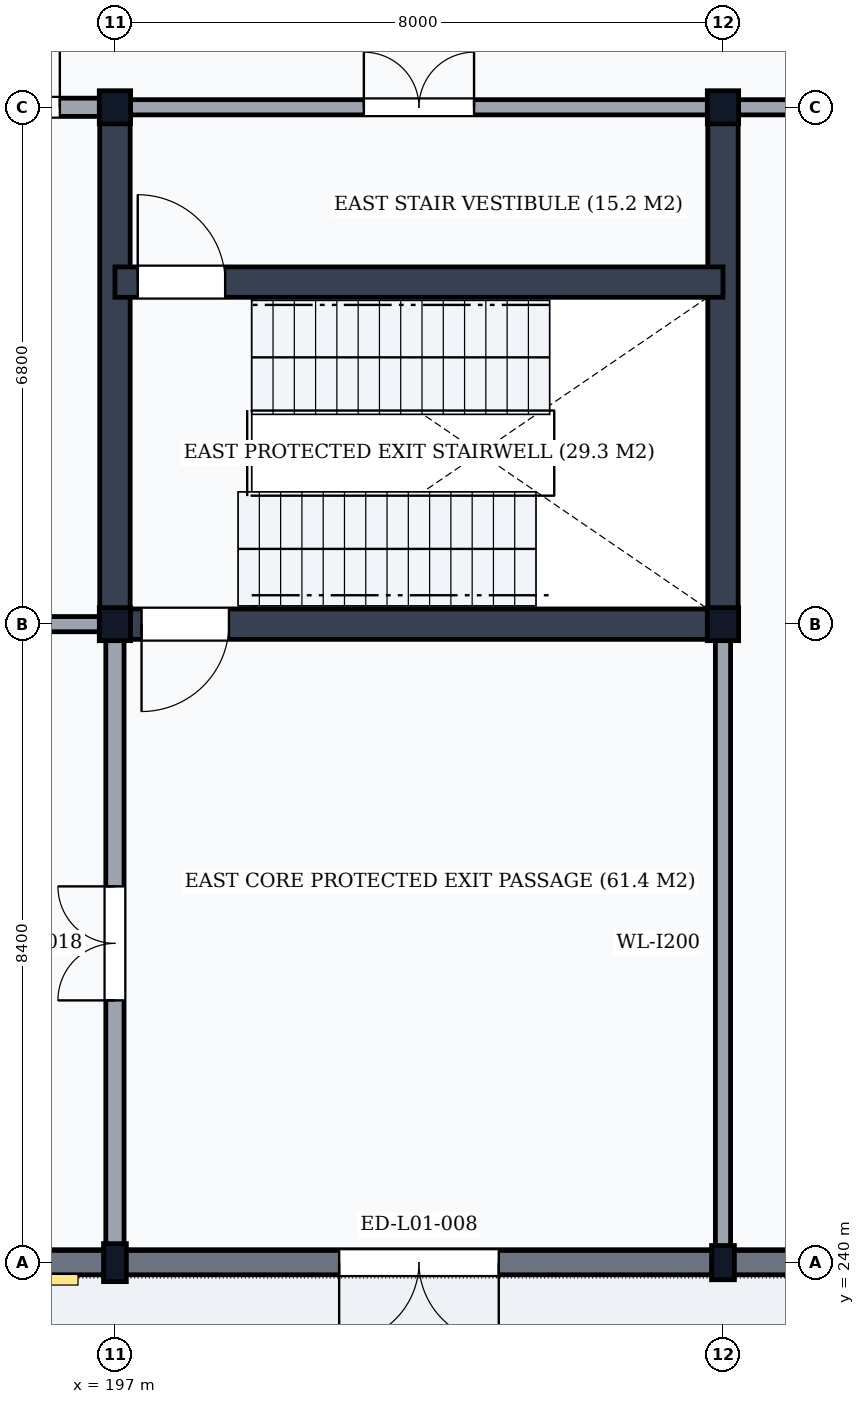
"""IFC4 building model, lengths in metres.
Left out: names, types, materials, properties, quantities, classifications, styles, units other than length and angle.
Written with IfcOpenShell. Run it as: python <this file> out.ifc"""

import sys

from ifc_helpers import new_model, si_unit, direction, frame, frame_2d, origin, origin_2d, place, context, subcontext, project, spatial, rectangle, i_section, extrude, element, fill, save


model = new_model("IFC4")
c1 = context("Model", 3, precision=1e-05, world=origin(), true_north=direction((0.0, 1.0)))
c2 = subcontext(c1, "Body", "Model", "MODEL_VIEW")
j1 = project(units=[si_unit("LENGTHUNIT", "METRE"), si_unit("PLANEANGLEUNIT", "RADIAN")], contexts=[c1])
p1 = place(None, origin())
s1 = spatial("IfcSite", under=j1, at=p1, CompositionType="ELEMENT")
p2 = place(p1, origin())
s2 = spatial("IfcBuilding", under=s1, at=p2, CompositionType="ELEMENT")
p3 = place(p2, origin())
s3 = spatial("IfcBuildingStorey", under=s2, at=p3, CompositionType="ELEMENT", Elevation=0.0)
p4 = place(p3, frame((197.0, 240.0, 0.0), z_axis=(0.0, 0.0, 1.0), x_axis=(1.0, 0.0, 0.0)))
e1 = element("IfcColumn", 1, at=p4, inside=s3, PredefinedType="COLUMN", context=c2, shape_type="SweptSolid", body=[
    extrude(i_section(OverallWidth=0.3, OverallDepth=0.5, WebThickness=0.014, FlangeThickness=0.028, FilletRadius=0.027, at=origin_2d()), origin(), (0.0, 0.0, 1.0), 5.4),
])
for number, where, z_axis, x_axis in (
    (2, (197.0, 248.4, 0.0), (0.0, 0.0, 1.0), (1.0, 0.0, 0.0)),
    (3, (197.0, 255.2, 0.0), (0.0, 0.0, 1.0), (1.0, 0.0, 0.0)),
):
    element("IfcColumn", number, at=place(p3, frame(where, z_axis=z_axis, x_axis=x_axis)), inside=s3, PredefinedType="COLUMN", context=c2, shape_type="SweptSolid", body=[
        extrude(i_section(OverallWidth=0.412, OverallDepth=0.435, WebThickness=0.036, FlangeThickness=0.057, FilletRadius=0.015, at=origin_2d()), origin(), (0.0, 0.0, 1.0), 5.4),
    ])
p5 = place(p3, frame((205.0, 240.0, 0.0), z_axis=(0.0, 0.0, 1.0), x_axis=(1.0, 0.0, 0.0)))
e4 = element("IfcColumn", 4, at=p5, inside=s3, PredefinedType="COLUMN", context=c2, shape_type="SweptSolid", body=[
    extrude(i_section(OverallWidth=0.3, OverallDepth=0.45, WebThickness=0.014, FlangeThickness=0.026, FilletRadius=0.027, at=origin_2d()), origin(), (0.0, 0.0, 1.0), 5.4),
])
for number, where, z_axis, x_axis in (
    (5, (205.0, 248.4, 0.0), (0.0, 0.0, 1.0), (1.0, 0.0, 0.0)),
    (6, (205.0, 255.2, 0.0), (0.0, 0.0, 1.0), (1.0, 0.0, 0.0)),
):
    element("IfcColumn", number, at=place(p3, frame(where, z_axis=z_axis, x_axis=x_axis)), inside=s3, PredefinedType="COLUMN", context=c2, shape_type="SweptSolid", body=[
        extrude(i_section(OverallWidth=0.412, OverallDepth=0.435, WebThickness=0.036, FlangeThickness=0.057, FilletRadius=0.015, at=origin_2d()), origin(), (0.0, 0.0, 1.0), 5.4),
    ])
p6 = place(p3, frame((189.006, 240.0, 0.0), z_axis=(0.0, 0.0, 1.0), x_axis=(1.0, 0.0, 0.0)))
e7 = element("IfcWall", 7, at=p6, inside=s3, PredefinedType="SOLIDWALL", context=c2, shape_type="SweptSolid", body=[
    extrude(rectangle(XDim=7.988, YDim=0.32, at=frame_2d((3.994, 0.0))), origin(), (0.0, 0.0, 1.0), 4.838),
])
p7 = place(p6, frame((2.944, 0.0, 0.0)))
e8 = element("IfcOpeningElement", 8, at=p7, cuts=e7, PredefinedType="OPENING", context=c2, shape_type="SweptSolid", body=[
    extrude(rectangle(XDim=2.1, YDim=2.7, at=frame_2d((1.05, 1.35))), frame((0.0, 0.175, 0.0), z_axis=(0.0, -1.0, 0.0), x_axis=(1.0, 0.0, 0.0)), (0.0, 0.0, 1.0), 0.35),
])
p8 = place(p3, frame((197.006, 240.0, 0.0), z_axis=(0.0, 0.0, 1.0), x_axis=(1.0, 0.0, 0.0)))
e9 = element("IfcWall", 9, at=p8, inside=s3, PredefinedType="SOLIDWALL", context=c2, shape_type="SweptSolid", body=[
    extrude(rectangle(XDim=7.988, YDim=0.32, at=frame_2d((3.994, 0.0))), origin(), (0.0, 0.0, 1.0), 4.838),
])
p9 = place(p8, frame((2.944, 0.0, 0.0)))
e10 = element("IfcOpeningElement", 10, at=p9, cuts=e9, PredefinedType="OPENING", context=c2, shape_type="SweptSolid", body=[
    extrude(rectangle(XDim=2.1, YDim=2.7, at=frame_2d((1.05, 1.35))), frame((0.0, 0.175, 0.0), z_axis=(0.0, -1.0, 0.0), x_axis=(1.0, 0.0, 0.0)), (0.0, 0.0, 1.0), 0.35),
])
p10 = place(p3, frame((205.006, 240.0, 0.0), z_axis=(0.0, 0.0, 1.0), x_axis=(1.0, 0.0, 0.0)))
e11 = element("IfcWall", 11, at=p10, inside=s3, PredefinedType="SOLIDWALL", context=c2, shape_type="SweptSolid", body=[
    extrude(rectangle(XDim=7.988, YDim=0.32, at=frame_2d((3.994, 0.0))), origin(), (0.0, 0.0, 1.0), 4.838),
])
p11 = place(p10, frame((2.944, 0.0, 0.0)))
e12 = element("IfcOpeningElement", 12, at=p11, cuts=e11, PredefinedType="OPENING", context=c2, shape_type="SweptSolid", body=[
    extrude(rectangle(XDim=2.1, YDim=2.7, at=frame_2d((1.05, 1.35))), frame((0.0, 0.175, 0.0), z_axis=(0.0, -1.0, 0.0), x_axis=(1.0, 0.0, 0.0)), (0.0, 0.0, 1.0), 0.35),
])
p12 = place(p3, frame((120.1, 240.1, 5.4), z_axis=(0.0, 0.0, 1.0), x_axis=(1.0, 0.0, 0.0)))
e13 = element("IfcWall", 13, at=p12, inside=s3, PredefinedType="PARAPET", context=c2, shape_type="SweptSolid", body=[
    extrude(rectangle(XDim=167.8, YDim=0.18, at=frame_2d((83.9, 0.0))), origin(), (0.0, 0.0, 1.0), 1.2),
])
p13 = place(p3, frame((197.0, 248.4, 0.0), z_axis=(0.0, 0.0, 1.0), x_axis=(1.0, 0.0, 0.0)))
e14 = element("IfcWall", 14, at=p13, inside=s3, PredefinedType="SHEAR", context=c2, shape_type="SweptSolid", body=[
    extrude(rectangle(XDim=8.0, YDim=0.4, at=frame_2d((4.0, 0.0))), origin(), (0.0, 0.0, 1.0), 5.14),
])
p14 = place(p13, frame((0.35, 0.0, 0.0)))
e15 = element("IfcOpeningElement", 15, at=p14, cuts=e14, PredefinedType="OPENING", context=c2, shape_type="SweptSolid", body=[
    extrude(rectangle(XDim=1.15, YDim=2.15, at=frame_2d((0.575, 1.075))), frame((0.0, 0.215, 0.0), z_axis=(0.0, -1.0, 0.0), x_axis=(1.0, 0.0, 0.0)), (0.0, 0.0, 1.0), 0.43),
])
for number, where, z_axis, x_axis in (
    (16, (197.0, 248.4, 0.0), (0.0, 0.0, 1.0), (0.0, 1.0, 0.0)),
    (17, (205.0, 248.4, 0.0), (0.0, 0.0, 1.0), (0.0, 1.0, 0.0)),
):
    element("IfcWall", number, at=place(p3, frame(where, z_axis=z_axis, x_axis=x_axis)), inside=s3, PredefinedType="SHEAR", context=c2, shape_type="SweptSolid", body=[
        extrude(rectangle(XDim=6.8, YDim=0.4, at=frame_2d((3.4, 0.0))), origin(), (0.0, 0.0, 1.0), 5.14),
    ])
p15 = place(p3, frame((197.0, 252.9, 0.0), z_axis=(0.0, 0.0, 1.0), x_axis=(1.0, 0.0, 0.0)))
e18 = element("IfcWall", 18, at=p15, inside=s3, PredefinedType="SHEAR", context=c2, shape_type="SweptSolid", body=[
    extrude(rectangle(XDim=8.0, YDim=0.4, at=frame_2d((4.0, 0.0))), origin(), (0.0, 0.0, 1.0), 5.14),
])
p16 = place(p15, frame((0.3, 0.0, 0.0)))
e19 = element("IfcOpeningElement", 19, at=p16, cuts=e18, PredefinedType="OPENING", context=c2, shape_type="SweptSolid", body=[
    extrude(rectangle(XDim=1.15, YDim=2.15, at=frame_2d((0.575, 1.075))), frame((0.0, 0.215, 0.0), z_axis=(0.0, -1.0, 0.0), x_axis=(1.0, 0.0, 0.0)), (0.0, 0.0, 1.0), 0.43),
])
p17 = place(p3, frame((197.0, 255.2, 0.0), z_axis=(0.0, 0.0, 1.0), x_axis=(1.0, 0.0, 0.0)))
e20 = element("IfcWall", 20, at=p17, inside=s3, PredefinedType="PARTITIONING", context=c2, shape_type="SweptSolid", body=[
    extrude(rectangle(XDim=8.0, YDim=0.2, at=frame_2d((4.0, 0.0))), origin(), (0.0, 0.0, 1.0), 4.638),
])
p18 = place(p17, frame((3.275, 0.0, 0.0)))
e21 = element("IfcOpeningElement", 21, at=p18, cuts=e20, PredefinedType="OPENING", context=c2, shape_type="SweptSolid", body=[
    extrude(rectangle(XDim=1.45, YDim=2.2, at=frame_2d((0.725, 1.1))), frame((0.0, 0.115, 0.0), z_axis=(0.0, -1.0, 0.0), x_axis=(1.0, 0.0, 0.0)), (0.0, 0.0, 1.0), 0.23),
])
p19 = place(p3, frame((189.0, 255.2, 0.0), z_axis=(0.0, 0.0, 1.0), x_axis=(1.0, 0.0, 0.0)))
e22 = element("IfcWall", 22, at=p19, inside=s3, PredefinedType="PARTITIONING", context=c2, shape_type="SweptSolid", body=[
    extrude(rectangle(XDim=8.0, YDim=0.24, at=frame_2d((4.0, 0.0))), origin(), (0.0, 0.0, 1.0), 4.638),
])
p20 = place(p19, frame((1.05, 0.0, 0.0)))
e23 = element("IfcOpeningElement", 23, at=p20, cuts=e22, PredefinedType="OPENING", context=c2, shape_type="SweptSolid", body=[
    extrude(rectangle(XDim=1.0, YDim=2.1, at=frame_2d((0.5, 1.05))), frame((0.0, 0.135, 0.0), z_axis=(0.0, -1.0, 0.0), x_axis=(1.0, 0.0, 0.0)), (0.0, 0.0, 1.0), 0.27),
])
p21 = place(p19, frame((3.6, 0.0, 0.0)))
e24 = element("IfcOpeningElement", 24, at=p21, cuts=e22, PredefinedType="OPENING", context=c2, shape_type="SweptSolid", body=[
    extrude(rectangle(XDim=1.5, YDim=2.25, at=frame_2d((0.75, 1.125))), frame((0.0, 0.135, 0.0), z_axis=(0.0, -1.0, 0.0), x_axis=(1.0, 0.0, 0.0)), (0.0, 0.0, 1.0), 0.27),
])
p22 = place(p19, frame((6.425, 0.0, 0.0)))
e25 = element("IfcOpeningElement", 25, at=p22, cuts=e22, PredefinedType="OPENING", context=c2, shape_type="SweptSolid", body=[
    extrude(rectangle(XDim=0.85, YDim=2.1, at=frame_2d((0.425, 1.05))), frame((0.0, 0.135, 0.0), z_axis=(0.0, -1.0, 0.0), x_axis=(1.0, 0.0, 0.0)), (0.0, 0.0, 1.0), 0.27),
])
p23 = place(p3, frame((197.0, 240.0, 0.0), z_axis=(0.0, 0.0, 1.0), x_axis=(0.0, 1.0, 0.0)))
e26 = element("IfcWall", 26, at=p23, inside=s3, PredefinedType="PARTITIONING", context=c2, shape_type="SweptSolid", body=[
    extrude(rectangle(XDim=8.4, YDim=0.24, at=frame_2d((4.2, 0.0))), origin(), (0.0, 0.0, 1.0), 4.688),
])
p24 = place(p23, frame((3.45, 0.0, 0.0)))
e27 = element("IfcOpeningElement", 27, at=p24, cuts=e26, PredefinedType="OPENING", context=c2, shape_type="SweptSolid", body=[
    extrude(rectangle(XDim=1.5, YDim=2.1, at=frame_2d((0.75, 1.05))), frame((0.0, 0.135, 0.0), z_axis=(0.0, -1.0, 0.0), x_axis=(1.0, 0.0, 0.0)), (0.0, 0.0, 1.0), 0.27),
])
p25 = place(p3, frame((189.0, 248.4, 0.0), z_axis=(0.0, 0.0, 1.0), x_axis=(1.0, 0.0, 0.0)))
e28 = element("IfcWall", 28, at=p25, inside=s3, PredefinedType="PARTITIONING", context=c2, shape_type="SweptSolid", body=[
    extrude(rectangle(XDim=8.0, YDim=0.2, at=frame_2d((4.0, 0.0))), origin(), (0.0, 0.0, 1.0), 4.638),
])
p26 = place(p3, frame((205.0, 240.0, 0.0), z_axis=(0.0, 0.0, 1.0), x_axis=(0.0, 1.0, 0.0)))
e29 = element("IfcWall", 29, at=p26, inside=s3, PredefinedType="PARTITIONING", context=c2, shape_type="SweptSolid", body=[
    extrude(rectangle(XDim=8.4, YDim=0.2, at=frame_2d((4.2, 0.0))), origin(), (0.0, 0.0, 1.0), 4.688),
])
p27 = place(p3, frame((205.0, 255.2, 0.0), z_axis=(0.0, 0.0, 1.0), x_axis=(1.0, 0.0, 0.0)))
e30 = element("IfcWall", 30, at=p27, inside=s3, PredefinedType="PARTITIONING", context=c2, shape_type="SweptSolid", body=[
    extrude(rectangle(XDim=24.0, YDim=0.2, at=frame_2d((12.0, 0.0))), origin(), (0.0, 0.0, 1.0), 4.638),
])
p28 = place(p27, frame((5.1, 0.0, 0.0)))
e31 = element("IfcOpeningElement", 31, at=p28, cuts=e30, PredefinedType="OPENING", context=c2, shape_type="SweptSolid", body=[
    extrude(rectangle(XDim=1.8, YDim=2.4, at=frame_2d((0.9, 1.2))), frame((0.0, 0.115, 0.0), z_axis=(0.0, -1.0, 0.0), x_axis=(1.0, 0.0, 0.0)), (0.0, 0.0, 1.0), 0.23),
])
p29 = place(p27, frame((17.2, 0.0, 0.0)))
e32 = element("IfcOpeningElement", 32, at=p29, cuts=e30, PredefinedType="OPENING", context=c2, shape_type="SweptSolid", body=[
    extrude(rectangle(XDim=1.6, YDim=2.25, at=frame_2d((0.8, 1.125))), frame((0.0, 0.115, 0.0), z_axis=(0.0, -1.0, 0.0), x_axis=(1.0, 0.0, 0.0)), (0.0, 0.0, 1.0), 0.23),
])
p30 = place(p9, frame((2.1, 0.0, 0.0), z_axis=(0.0, 0.0, 1.0), x_axis=(-1.0, 0.0, 0.0)))
e33 = element("IfcDoor", 33, at=p30, inside=s3, OperationType="DOUBLE_DOOR_SINGLE_SWING", PredefinedType="DOOR", context=c2, shape_type="SweptSolid", body=[
    extrude(rectangle(XDim=2.1, YDim=2.7, at=frame_2d((1.05, 1.35))), frame((0.0, 0.025, 0.0), z_axis=(0.0, -1.0, 0.0), x_axis=(1.0, 0.0, 0.0)), (0.0, 0.0, 1.0), 0.05),
])
fill(e10, e33)
p31 = place(p16, origin())
e34 = element("IfcDoor", 34, at=p31, inside=s3, OperationType="SINGLE_SWING_LEFT", PredefinedType="DOOR", context=c2, shape_type="SweptSolid", body=[
    extrude(rectangle(XDim=1.15, YDim=2.15, at=frame_2d((0.575, 1.075))), frame((0.0, 0.025, 0.0), z_axis=(0.0, -1.0, 0.0), x_axis=(1.0, 0.0, 0.0)), (0.0, 0.0, 1.0), 0.05),
])
fill(e19, e34)
p32 = place(p14, frame((1.15, 0.0, 0.0), z_axis=(0.0, 0.0, 1.0), x_axis=(-1.0, 0.0, 0.0)))
e35 = element("IfcDoor", 35, at=p32, inside=s3, OperationType="SINGLE_SWING_RIGHT", PredefinedType="DOOR", context=c2, shape_type="SweptSolid", body=[
    extrude(rectangle(XDim=1.15, YDim=2.15, at=frame_2d((0.575, 1.075))), frame((0.0, 0.025, 0.0), z_axis=(0.0, -1.0, 0.0), x_axis=(1.0, 0.0, 0.0)), (0.0, 0.0, 1.0), 0.05),
])
fill(e15, e35)
p33 = place(p18, origin())
e36 = element("IfcDoor", 36, at=p33, inside=s3, OperationType="DOUBLE_DOOR_SINGLE_SWING", PredefinedType="DOOR", context=c2, shape_type="SweptSolid", body=[
    extrude(rectangle(XDim=1.45, YDim=2.2, at=frame_2d((0.725, 1.1))), frame((0.0, 0.025, 0.0), z_axis=(0.0, -1.0, 0.0), x_axis=(1.0, 0.0, 0.0)), (0.0, 0.0, 1.0), 0.05),
])
fill(e21, e36)
p34 = place(p22, frame((0.85, 0.0, 0.0), z_axis=(0.0, 0.0, 1.0), x_axis=(-1.0, 0.0, 0.0)))
e37 = element("IfcDoor", 37, at=p34, inside=s3, OperationType="SINGLE_SWING_LEFT", PredefinedType="DOOR", context=c2, shape_type="SweptSolid", body=[
    extrude(rectangle(XDim=0.85, YDim=2.1, at=frame_2d((0.425, 1.05))), frame((0.0, 0.025, 0.0), z_axis=(0.0, -1.0, 0.0), x_axis=(1.0, 0.0, 0.0)), (0.0, 0.0, 1.0), 0.05),
])
fill(e25, e37)
p35 = place(p24, origin())
e38 = element("IfcDoor", 38, at=p35, inside=s3, OperationType="DOUBLE_DOOR_SINGLE_SWING", PredefinedType="DOOR", context=c2, shape_type="SweptSolid", body=[
    extrude(rectangle(XDim=1.5, YDim=2.1, at=frame_2d((0.75, 1.05))), frame((0.0, 0.025, 0.0), z_axis=(0.0, -1.0, 0.0), x_axis=(1.0, 0.0, 0.0)), (0.0, 0.0, 1.0), 0.05),
])
fill(e27, e38)
save(model, sys.argv[1])
